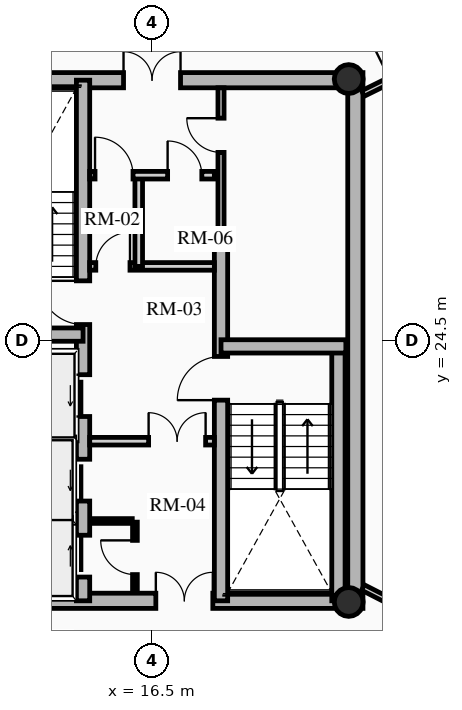
"""IFC4 building model, lengths in metres.
Left out: names, types, materials, properties, quantities, classifications, styles, units other than length and angle.
Written with IfcOpenShell. Run it as: python <this file> out.ifc"""

import sys

from ifc_helpers import new_model, si_unit, direction, frame, frame_2d, origin, origin_2d, place, context, subcontext, project, spatial, rectangle, hollow_circle, extrude, source, transform, mapped, element, fill, save


model = new_model("IFC4")
c1 = context("Model", 3, precision=1e-05, world=origin(), true_north=direction((0.0, 1.0)))
c2 = subcontext(c1, "Body", "Model", "MODEL_VIEW")
j1 = project(units=[si_unit("LENGTHUNIT", "METRE"), si_unit("PLANEANGLEUNIT", "RADIAN")], contexts=[c1])
p1 = place(None, origin())
s1 = spatial("IfcSite", under=j1, at=p1, CompositionType="ELEMENT")
p2 = place(p1, origin())
s2 = spatial("IfcBuilding", under=s1, at=p2, CompositionType="ELEMENT")
p3 = place(p2, frame((0.0, 0.0, 177.79)))
s3 = spatial("IfcBuildingStorey", under=s2, at=p3, CompositionType="ELEMENT", Elevation=177.79)
p4 = place(p3, frame((21.85, 17.45, 0.0), z_axis=(0.0, 0.0, 1.0), x_axis=(0.0, 1.0, 0.0)))
e1 = element("IfcWall", 1, at=p4, inside=s3, PredefinedType="SHEAR", context=c2, shape_type="SweptSolid", body=[
    extrude(rectangle(XDim=14.1, YDim=0.4, at=frame_2d((7.05, 0.0))), origin(), (0.0, 0.0, 1.0), 2.91),
])
p5 = place(p3, frame((11.15, 17.65, 0.0), z_axis=(0.0, 0.0, 1.0), x_axis=(1.0, 0.0, 0.0)))
e2 = element("IfcWall", 2, at=p5, inside=s3, PredefinedType="SHEAR", context=c2, shape_type="SweptSolid", body=[
    extrude(rectangle(XDim=10.7, YDim=0.4, at=frame_2d((5.35, 0.0))), origin(), (0.0, 0.0, 1.0), 2.91),
])
m1 = source(origin(), c2, "Body", "SweptSolid", [
    extrude(rectangle(XDim=1.5, YDim=2.02, at=frame_2d((0.75, 1.01))), frame((0.0, 0.21, 0.0), z_axis=(0.0, -1.0, 0.0), x_axis=(1.0, 0.0, 0.0)), (0.0, 0.0, 1.0), 0.42),
])
p6 = place(p5, frame((5.45, 0.0, 0.0)))
e3 = element("IfcOpeningElement", 3, at=p6, cuts=e2, PredefinedType="OPENING", context=c2, shape_type="MappedRepresentation", body=[
    mapped(m1, transform((0.0, 0.0, 0.0), x_axis=(1.0, 0.0, 0.0), y_axis=(0.0, 1.0, 0.0), z_axis=(0.0, 0.0, 1.0), scale=1.0)),
])
p7 = place(p3, frame((11.15, 31.35, 0.0), z_axis=(0.0, 0.0, 1.0), x_axis=(1.0, 0.0, 0.0)))
e4 = element("IfcWall", 4, at=p7, inside=s3, PredefinedType="SHEAR", context=c2, shape_type="SweptSolid", body=[
    extrude(rectangle(XDim=10.7, YDim=0.4, at=frame_2d((5.35, 0.0))), origin(), (0.0, 0.0, 1.0), 2.91),
])
p8 = place(p7, frame((4.6, 0.0, 0.0)))
e5 = element("IfcOpeningElement", 5, at=p8, cuts=e4, PredefinedType="OPENING", context=c2, shape_type="MappedRepresentation", body=[
    mapped(m1, transform((0.0, 0.0, 0.0), x_axis=(1.0, 0.0, 0.0), y_axis=(0.0, 1.0, 0.0), z_axis=(0.0, 0.0, 1.0), scale=1.0)),
])
p9 = place(p3, frame((14.685, 17.65, 0.0), z_axis=(0.0, 0.0, 1.0), x_axis=(0.0, 1.0, 0.0)))
e6 = element("IfcWall", 6, at=p9, inside=s3, PredefinedType="SHEAR", context=c2, shape_type="SweptSolid", body=[
    extrude(rectangle(XDim=13.7, YDim=0.35, at=frame_2d((6.85, 0.0))), origin(), (0.0, 0.0, 1.0), 2.91),
])
m2 = source(origin(), c2, "Body", "SweptSolid", [
    extrude(rectangle(XDim=1.1, YDim=2.015, at=frame_2d((0.55, 1.007))), frame((0.0, 0.185, 0.0), z_axis=(0.0, -1.0, 0.0), x_axis=(1.0, 0.0, 0.0)), (0.0, 0.0, 1.0), 0.37),
])
p10 = place(p9, frame((4.85, 0.0, 0.0)))
e7 = element("IfcOpeningElement", 7, at=p10, cuts=e6, PredefinedType="OPENING", context=c2, shape_type="MappedRepresentation", body=[
    mapped(m2, transform((0.0, 0.0, 0.0), x_axis=(1.0, 0.0, 0.0), y_axis=(0.0, 1.0, 0.0), z_axis=(0.0, 0.0, 1.0), scale=1.0)),
])
p11 = place(p9, frame((0.625, 0.0, 0.0)))
e8 = element("IfcOpeningElement", 8, at=p11, cuts=e6, PredefinedType="OPENING", context=c2, shape_type="MappedRepresentation", body=[
    mapped(m2, transform((0.0, 0.0, 0.0), x_axis=(1.0, 0.0, 0.0), y_axis=(0.0, 1.0, 0.0), z_axis=(0.0, 0.0, 1.0), scale=1.0)),
])
p12 = place(p9, frame((2.625, 0.0, 0.0)))
e9 = element("IfcOpeningElement", 9, at=p12, cuts=e6, PredefinedType="OPENING", context=c2, shape_type="MappedRepresentation", body=[
    mapped(m2, transform((0.0, 0.0, 0.0), x_axis=(1.0, 0.0, 0.0), y_axis=(0.0, 1.0, 0.0), z_axis=(0.0, 0.0, 1.0), scale=1.0)),
])
m3 = source(origin(), c2, "Body", "SweptSolid", [
    extrude(rectangle(XDim=1.15, YDim=2.02, at=frame_2d((0.575, 1.01))), frame((0.0, 0.185, 0.0), z_axis=(0.0, -1.0, 0.0), x_axis=(1.0, 0.0, 0.0)), (0.0, 0.0, 1.0), 0.37),
])
p13 = place(p9, frame((7.27, 0.0, 0.0)))
e10 = element("IfcOpeningElement", 10, at=p13, cuts=e6, PredefinedType="OPENING", context=c2, shape_type="MappedRepresentation", body=[
    mapped(m3, transform((0.0, 0.0, 0.0), x_axis=(1.0, 0.0, 0.0), y_axis=(0.0, 1.0, 0.0), z_axis=(0.0, 0.0, 1.0), scale=1.0)),
])
p14 = place(p3, frame((18.315, 17.65, 0.0), z_axis=(0.0, 0.0, 1.0), x_axis=(0.0, 1.0, 0.0)))
e11 = element("IfcWall", 11, at=p14, inside=s3, PredefinedType="SHEAR", context=c2, shape_type="SweptSolid", body=[
    extrude(rectangle(XDim=9.6, YDim=0.35, at=frame_2d((4.8, 0.0))), origin(), (0.0, 0.0, 1.0), 2.91),
])
p15 = place(p14, frame((5.28, 0.0, 0.0)))
e12 = element("IfcOpeningElement", 12, at=p15, cuts=e11, PredefinedType="OPENING", context=c2, shape_type="MappedRepresentation", body=[
    mapped(m3, transform((0.0, 0.0, 0.0), x_axis=(1.0, 0.0, 0.0), y_axis=(0.0, 1.0, 0.0), z_axis=(0.0, 0.0, 1.0), scale=1.0)),
])
p16 = place(p3, frame((11.4, 24.655, 0.0), z_axis=(0.0, 0.0, 1.0), x_axis=(1.0, 0.0, 0.0)))
e13 = element("IfcWall", 13, at=p16, inside=s3, PredefinedType="SHEAR", context=c2, shape_type="SweptSolid", body=[
    extrude(rectangle(XDim=3.285, YDim=0.35, at=frame_2d((1.643, 0.0))), origin(), (0.0, 0.0, 1.0), 2.91),
])
p17 = place(p3, frame((21.405, 17.65, 0.0), z_axis=(0.0, 0.0, 1.0), x_axis=(0.0, 1.0, 0.0)))
e14 = element("IfcWall", 14, at=p17, inside=s3, PredefinedType="SHEAR", context=c2, shape_type="SweptSolid", body=[
    extrude(rectangle(XDim=6.695, YDim=0.35, at=frame_2d((3.348, 0.0))), origin(), (0.0, 0.0, 1.0), 2.91),
])
p18 = place(p3, frame((18.315, 24.345, 0.0), z_axis=(0.0, 0.0, 1.0), x_axis=(1.0, 0.0, 0.0)))
e15 = element("IfcWall", 15, at=p18, inside=s3, PredefinedType="SHEAR", context=c2, shape_type="SweptSolid", body=[
    extrude(rectangle(XDim=3.285, YDim=0.35, at=frame_2d((1.643, 0.0))), origin(), (0.0, 0.0, 1.0), 2.91),
])
for number, where, z_axis, x_axis in (
    (16, (21.675, 17.62, 0.0), (0.0, 0.0, 1.0), (1.0, 0.0, 0.0)),
    (17, (21.675, 31.38, 0.0), (0.0, 0.0, 1.0), (1.0, 0.0, 0.0)),
):
    element("IfcColumn", number, at=place(p3, frame(where, z_axis=z_axis, x_axis=x_axis)), inside=s3, PredefinedType="COLUMN", context=c2, shape_type="SweptSolid", body=[
        extrude(hollow_circle(Radius=0.38, WallThickness=0.032, at=origin_2d()), origin(), (0.0, 0.0, 1.0), 2.91),
    ])
for number, where, z_axis, x_axis in (
    (18, (11.52, 21.8, 0.0), (0.0, 0.0, 1.0), (1.0, 0.0, 0.0)),
    (19, (11.52, 19.825, 0.0), (0.0, 0.0, 1.0), (1.0, 0.0, 0.0)),
):
    element("IfcWall", number, at=place(p3, frame(where, z_axis=z_axis, x_axis=x_axis)), inside=s3, PredefinedType="SHEAR", context=c2, shape_type="SweptSolid", body=[
        extrude(rectangle(XDim=2.97, YDim=0.2, at=frame_2d((1.485, 0.0))), origin(), (0.0, 0.0, 1.0), 2.91),
    ])
p19 = place(p3, frame((14.86, 21.85, 0.0), z_axis=(0.0, 0.0, 1.0), x_axis=(1.0, 0.0, 0.0)))
e20 = element("IfcWall", 20, at=p19, inside=s3, PredefinedType="PARTITIONING", context=c2, shape_type="SweptSolid", body=[
    extrude(rectangle(XDim=3.28, YDim=0.2, at=frame_2d((1.64, 0.0))), origin(), (0.0, 0.0, 1.0), 2.675),
])
m4 = source(origin(), c2, "Body", "SweptSolid", [
    extrude(rectangle(XDim=1.5, YDim=2.02, at=frame_2d((0.75, 1.01))), frame((0.0, 0.11, 0.0), z_axis=(0.0, -1.0, 0.0), x_axis=(1.0, 0.0, 0.0)), (0.0, 0.0, 1.0), 0.22),
])
p20 = place(p19, frame((1.55, 0.0, 0.0)))
e21 = element("IfcOpeningElement", 21, at=p20, cuts=e20, PredefinedType="OPENING", context=c2, shape_type="MappedRepresentation", body=[
    mapped(m4, transform((0.0, 0.0, 0.0), x_axis=(1.0, 0.0, 0.0), y_axis=(0.0, 1.0, 0.0), z_axis=(0.0, 0.0, 1.0), scale=1.0)),
])
p21 = place(p3, frame((14.86, 26.45, 0.0), z_axis=(0.0, 0.0, 1.0), x_axis=(1.0, 0.0, 0.0)))
e22 = element("IfcWall", 22, at=p21, inside=s3, PredefinedType="PARTITIONING", context=c2, shape_type="SweptSolid", body=[
    extrude(rectangle(XDim=3.28, YDim=0.2, at=frame_2d((1.64, 0.0))), origin(), (0.0, 0.0, 1.0), 2.675),
])
m5 = source(origin(), c2, "Body", "SweptSolid", [
    extrude(rectangle(XDim=0.9, YDim=2.005, at=frame_2d((0.45, 1.002))), frame((0.0, 0.11, 0.0), z_axis=(0.0, -1.0, 0.0), x_axis=(1.0, 0.0, 0.0)), (0.0, 0.0, 1.0), 0.22),
])
p22 = place(p21, frame((0.16, 0.0, 0.0)))
e23 = element("IfcOpeningElement", 23, at=p22, cuts=e22, PredefinedType="OPENING", context=c2, shape_type="MappedRepresentation", body=[
    mapped(m5, transform((0.0, 0.0, 0.0), x_axis=(1.0, 0.0, 0.0), y_axis=(0.0, 1.0, 0.0), z_axis=(0.0, 0.0, 1.0), scale=1.0)),
])
p23 = place(p3, frame((16.15, 26.45, 0.0), z_axis=(0.0, 0.0, 1.0), x_axis=(0.0, 1.0, 0.0)))
e24 = element("IfcWall", 24, at=p23, inside=s3, PredefinedType="PARTITIONING", context=c2, shape_type="SweptSolid", body=[
    extrude(rectangle(XDim=2.4, YDim=0.2, at=frame_2d((1.2, 0.0))), origin(), (0.0, 0.0, 1.0), 2.675),
])
p24 = place(p3, frame((14.86, 28.85, 0.0), z_axis=(0.0, 0.0, 1.0), x_axis=(1.0, 0.0, 0.0)))
e25 = element("IfcWall", 25, at=p24, inside=s3, PredefinedType="PARTITIONING", context=c2, shape_type="SweptSolid", body=[
    extrude(rectangle(XDim=3.28, YDim=0.2, at=frame_2d((1.64, 0.0))), origin(), (0.0, 0.0, 1.0), 2.675),
])
m6 = source(origin(), c2, "Body", "SweptSolid", [
    extrude(rectangle(XDim=1.0, YDim=2.015, at=frame_2d((0.5, 1.007))), frame((0.0, 0.11, 0.0), z_axis=(0.0, -1.0, 0.0), x_axis=(1.0, 0.0, 0.0)), (0.0, 0.0, 1.0), 0.22),
])
p25 = place(p24, frame((0.14, 0.0, 0.0)))
e26 = element("IfcOpeningElement", 26, at=p25, cuts=e25, PredefinedType="OPENING", context=c2, shape_type="MappedRepresentation", body=[
    mapped(m6, transform((0.0, 0.0, 0.0), x_axis=(1.0, 0.0, 0.0), y_axis=(0.0, 1.0, 0.0), z_axis=(0.0, 0.0, 1.0), scale=1.0)),
])
p26 = place(p24, frame((2.05, 0.0, 0.0)))
e27 = element("IfcOpeningElement", 27, at=p26, cuts=e25, PredefinedType="OPENING", context=c2, shape_type="MappedRepresentation", body=[
    mapped(m5, transform((0.0, 0.0, 0.0), x_axis=(1.0, 0.0, 0.0), y_axis=(0.0, 1.0, 0.0), z_axis=(0.0, 0.0, 1.0), scale=1.0)),
])
p27 = place(p3, frame((16.05, 17.92, 0.0), z_axis=(0.0, 0.0, 1.0), x_axis=(0.0, 1.0, 0.0)))
e28 = element("IfcWall", 28, at=p27, inside=s3, PredefinedType="PARTITIONING", context=c2, shape_type="SweptSolid", body=[
    extrude(rectangle(XDim=1.8, YDim=0.125, at=frame_2d((0.9, 0.0))), origin(), (0.0, 0.0, 1.0), 2.675),
])
m7 = source(origin(), c2, "Body", "SweptSolid", [
    extrude(rectangle(XDim=0.9, YDim=2.005, at=frame_2d((0.45, 1.002))), frame((0.0, 0.073, 0.0), z_axis=(0.0, -1.0, 0.0), x_axis=(1.0, 0.0, 0.0)), (0.0, 0.0, 1.0), 0.145),
])
p28 = place(p27, frame((0.42, 0.0, 0.0)))
e29 = element("IfcOpeningElement", 29, at=p28, cuts=e28, PredefinedType="OPENING", context=c2, shape_type="MappedRepresentation", body=[
    mapped(m7, transform((0.0, 0.0, 0.0), x_axis=(1.0, 0.0, 0.0), y_axis=(0.0, 1.0, 0.0), z_axis=(0.0, 0.0, 1.0), scale=1.0)),
])
p29 = place(p3, frame((14.88, 19.75, 0.0), z_axis=(0.0, 0.0, 1.0), x_axis=(1.0, 0.0, 0.0)))
e30 = element("IfcWall", 30, at=p29, inside=s3, PredefinedType="PARTITIONING", context=c2, shape_type="SweptSolid", body=[
    extrude(rectangle(XDim=1.1, YDim=0.125, at=frame_2d((0.55, 0.0))), origin(), (0.0, 0.0, 1.0), 2.675),
])
p30 = place(p3, frame((18.315, 27.25, 0.0), z_axis=(0.0, 0.0, 1.0), x_axis=(0.0, 1.0, 0.0)))
e31 = element("IfcWall", 31, at=p30, inside=s3, PredefinedType="PARTITIONING", context=c2, shape_type="SweptSolid", body=[
    extrude(rectangle(XDim=3.9, YDim=0.16, at=frame_2d((1.95, 0.0))), origin(), (0.0, 0.0, 1.0), 2.675),
])
m8 = source(origin(), c2, "Body", "SweptSolid", [
    extrude(rectangle(XDim=0.9, YDim=2.005, at=frame_2d((0.45, 1.002))), frame((0.0, 0.09, 0.0), z_axis=(0.0, -1.0, 0.0), x_axis=(1.0, 0.0, 0.0)), (0.0, 0.0, 1.0), 0.18),
])
p31 = place(p30, frame((2.2, 0.0, 0.0)))
e32 = element("IfcOpeningElement", 32, at=p31, cuts=e31, PredefinedType="OPENING", context=c2, shape_type="MappedRepresentation", body=[
    mapped(m8, transform((0.0, 0.0, 0.0), x_axis=(1.0, 0.0, 0.0), y_axis=(0.0, 1.0, 0.0), z_axis=(0.0, 0.0, 1.0), scale=1.0)),
])
p32 = place(p3, frame((22.05, 31.0, 0.0), z_axis=(0.0, 0.0, 1.0), x_axis=(0.896798317999, 0.442439574218, 0.0)))
e33 = element("IfcWall", 33, at=p32, inside=s3, PredefinedType="PARTITIONING", context=c2, shape_type="SweptSolid", body=[
    extrude(rectangle(XDim=2.048, YDim=0.16, at=frame_2d((1.024, 0.0))), origin(), (0.0, 0.0, 1.0), 2.245),
])
m9 = source(origin(), c2, "Body", "SweptSolid", [
    extrude(rectangle(XDim=1.05, YDim=2.015, at=frame_2d((0.525, 1.007))), frame((0.0, 0.09, 0.0), z_axis=(0.0, -1.0, 0.0), x_axis=(1.0, 0.0, 0.0)), (0.0, 0.0, 1.0), 0.18),
])
p33 = place(p32, frame((0.798, 0.0, 0.0)))
e34 = element("IfcOpeningElement", 34, at=p33, cuts=e33, PredefinedType="OPENING", context=c2, shape_type="MappedRepresentation", body=[
    mapped(m9, transform((0.0, 0.0, 0.0), x_axis=(1.0, 0.0, 0.0), y_axis=(0.0, 1.0, 0.0), z_axis=(0.0, 0.0, 1.0), scale=1.0)),
])
p34 = place(p3, frame((22.05, 18.0, 0.0), z_axis=(0.0, 0.0, 1.0), x_axis=(0.890660222535, -0.454669515136, 0.0)))
e35 = element("IfcWall", 35, at=p34, inside=s3, PredefinedType="PARTITIONING", context=c2, shape_type="SweptSolid", body=[
    extrude(rectangle(XDim=2.144, YDim=0.16, at=frame_2d((1.072, 0.0))), origin(), (0.0, 0.0, 1.0), 2.245),
])
p35 = place(p34, frame((0.894, 0.0, 0.0)))
e36 = element("IfcOpeningElement", 36, at=p35, cuts=e35, PredefinedType="OPENING", context=c2, shape_type="MappedRepresentation", body=[
    mapped(m9, transform((0.0, 0.0, 0.0), x_axis=(1.0, 0.0, 0.0), y_axis=(0.0, 1.0, 0.0), z_axis=(0.0, 0.0, 1.0), scale=1.0)),
])
m10 = source(origin(), c2, "Body", "SweptSolid", [
    extrude(rectangle(XDim=1.1, YDim=2.015, at=frame_2d((0.55, 1.007))), frame((0.0, 0.025, 0.0), z_axis=(0.0, -1.0, 0.0), x_axis=(1.0, 0.0, 0.0)), (0.0, 0.0, 1.0), 0.05),
])
p36 = place(p10, origin())
e37 = element("IfcDoor", 37, at=p36, inside=s3, OperationType="SLIDING_TO_LEFT", PredefinedType="DOOR", context=c2, shape_type="MappedRepresentation", body=[
    mapped(m10, transform((0.0, 0.0, 0.0), x_axis=(1.0, 0.0, 0.0), y_axis=(0.0, 1.0, 0.0), z_axis=(0.0, 0.0, 1.0), scale=1.0)),
])
fill(e7, e37)
p37 = place(p11, origin())
e38 = element("IfcDoor", 38, at=p37, inside=s3, OperationType="SLIDING_TO_RIGHT", PredefinedType="DOOR", context=c2, shape_type="MappedRepresentation", body=[
    mapped(m10, transform((0.0, 0.0, 0.0), x_axis=(1.0, 0.0, 0.0), y_axis=(0.0, 1.0, 0.0), z_axis=(0.0, 0.0, 1.0), scale=1.0)),
])
fill(e8, e38)
p38 = place(p12, origin())
e39 = element("IfcDoor", 39, at=p38, inside=s3, OperationType="SLIDING_TO_LEFT", PredefinedType="DOOR", context=c2, shape_type="MappedRepresentation", body=[
    mapped(m10, transform((0.0, 0.0, 0.0), x_axis=(1.0, 0.0, 0.0), y_axis=(0.0, 1.0, 0.0), z_axis=(0.0, 0.0, 1.0), scale=1.0)),
])
fill(e9, e39)
m11 = source(origin(), c2, "Body", "SweptSolid", [
    extrude(rectangle(XDim=1.15, YDim=2.02, at=frame_2d((0.575, 1.01))), frame((0.0, 0.025, 0.0), z_axis=(0.0, -1.0, 0.0), x_axis=(1.0, 0.0, 0.0)), (0.0, 0.0, 1.0), 0.05),
])
p39 = place(p13, origin())
e40 = element("IfcDoor", 40, at=p39, inside=s3, OperationType="SINGLE_SWING_RIGHT", PredefinedType="DOOR", context=c2, shape_type="MappedRepresentation", body=[
    mapped(m11, transform((0.0, 0.0, 0.0), x_axis=(1.0, 0.0, 0.0), y_axis=(0.0, 1.0, 0.0), z_axis=(0.0, 0.0, 1.0), scale=1.0)),
])
fill(e10, e40)
p40 = place(p15, origin())
e41 = element("IfcDoor", 41, at=p40, inside=s3, OperationType="SINGLE_SWING_LEFT", PredefinedType="DOOR", context=c2, shape_type="MappedRepresentation", body=[
    mapped(m11, transform((0.0, 0.0, 0.0), x_axis=(1.0, 0.0, 0.0), y_axis=(0.0, 1.0, 0.0), z_axis=(0.0, 0.0, 1.0), scale=1.0)),
])
fill(e12, e41)
m12 = source(origin(), c2, "Body", "SweptSolid", [
    extrude(rectangle(XDim=1.5, YDim=2.02, at=frame_2d((0.75, 1.01))), frame((0.0, 0.025, 0.0), z_axis=(0.0, -1.0, 0.0), x_axis=(1.0, 0.0, 0.0)), (0.0, 0.0, 1.0), 0.05),
])
p41 = place(p8, origin())
e42 = element("IfcDoor", 42, at=p41, inside=s3, OperationType="DOUBLE_DOOR_SINGLE_SWING", PredefinedType="DOOR", context=c2, shape_type="MappedRepresentation", body=[
    mapped(m12, transform((0.0, 0.0, 0.0), x_axis=(1.0, 0.0, 0.0), y_axis=(0.0, 1.0, 0.0), z_axis=(0.0, 0.0, 1.0), scale=1.0)),
])
fill(e5, e42)
p42 = place(p6, origin())
e43 = element("IfcDoor", 43, at=p42, inside=s3, OperationType="DOUBLE_DOOR_SINGLE_SWING", PredefinedType="DOOR", context=c2, shape_type="MappedRepresentation", body=[
    mapped(m12, transform((0.0, 0.0, 0.0), x_axis=(1.0, 0.0, 0.0), y_axis=(0.0, 1.0, 0.0), z_axis=(0.0, 0.0, 1.0), scale=1.0)),
])
fill(e3, e43)
p43 = place(p20, origin())
e44 = element("IfcDoor", 44, at=p43, inside=s3, OperationType="DOUBLE_DOOR_SINGLE_SWING", PredefinedType="DOOR", context=c2, shape_type="MappedRepresentation", body=[
    mapped(m12, transform((0.0, 0.0, 0.0), x_axis=(1.0, 0.0, 0.0), y_axis=(0.0, 1.0, 0.0), z_axis=(0.0, 0.0, 1.0), scale=1.0)),
])
fill(e21, e44)
m13 = source(origin(), c2, "Body", "SweptSolid", [
    extrude(rectangle(XDim=0.9, YDim=2.005, at=frame_2d((0.45, 1.002))), frame((0.0, 0.025, 0.0), z_axis=(0.0, -1.0, 0.0), x_axis=(1.0, 0.0, 0.0)), (0.0, 0.0, 1.0), 0.05),
])
p44 = place(p22, origin())
e45 = element("IfcDoor", 45, at=p44, inside=s3, OperationType="SINGLE_SWING_RIGHT", PredefinedType="DOOR", context=c2, shape_type="MappedRepresentation", body=[
    mapped(m13, transform((0.0, 0.0, 0.0), x_axis=(1.0, 0.0, 0.0), y_axis=(0.0, 1.0, 0.0), z_axis=(0.0, 0.0, 1.0), scale=1.0)),
])
fill(e23, e45)
m14 = source(origin(), c2, "Body", "SweptSolid", [
    extrude(rectangle(XDim=1.0, YDim=2.015, at=frame_2d((0.5, 1.007))), frame((0.0, 0.025, 0.0), z_axis=(0.0, -1.0, 0.0), x_axis=(1.0, 0.0, 0.0)), (0.0, 0.0, 1.0), 0.05),
])
p45 = place(p25, origin())
e46 = element("IfcDoor", 46, at=p45, inside=s3, OperationType="SINGLE_SWING_LEFT", PredefinedType="DOOR", context=c2, shape_type="MappedRepresentation", body=[
    mapped(m14, transform((0.0, 0.0, 0.0), x_axis=(1.0, 0.0, 0.0), y_axis=(0.0, 1.0, 0.0), z_axis=(0.0, 0.0, 1.0), scale=1.0)),
])
fill(e26, e46)
p46 = place(p28, origin())
e47 = element("IfcDoor", 47, at=p46, inside=s3, OperationType="SINGLE_SWING_RIGHT", PredefinedType="DOOR", context=c2, shape_type="MappedRepresentation", body=[
    mapped(m13, transform((0.0, 0.0, 0.0), x_axis=(1.0, 0.0, 0.0), y_axis=(0.0, 1.0, 0.0), z_axis=(0.0, 0.0, 1.0), scale=1.0)),
])
fill(e29, e47)
p47 = place(p26, origin())
e48 = element("IfcDoor", 48, at=p47, inside=s3, OperationType="SINGLE_SWING_LEFT", PredefinedType="DOOR", context=c2, shape_type="MappedRepresentation", body=[
    mapped(m13, transform((0.0, 0.0, 0.0), x_axis=(1.0, 0.0, 0.0), y_axis=(0.0, 1.0, 0.0), z_axis=(0.0, 0.0, 1.0), scale=1.0)),
])
fill(e27, e48)
p48 = place(p31, origin())
e49 = element("IfcDoor", 49, at=p48, inside=s3, OperationType="SINGLE_SWING_RIGHT", PredefinedType="DOOR", context=c2, shape_type="MappedRepresentation", body=[
    mapped(m13, transform((0.0, 0.0, 0.0), x_axis=(1.0, 0.0, 0.0), y_axis=(0.0, 1.0, 0.0), z_axis=(0.0, 0.0, 1.0), scale=1.0)),
])
fill(e32, e49)
save(model, sys.argv[1])
